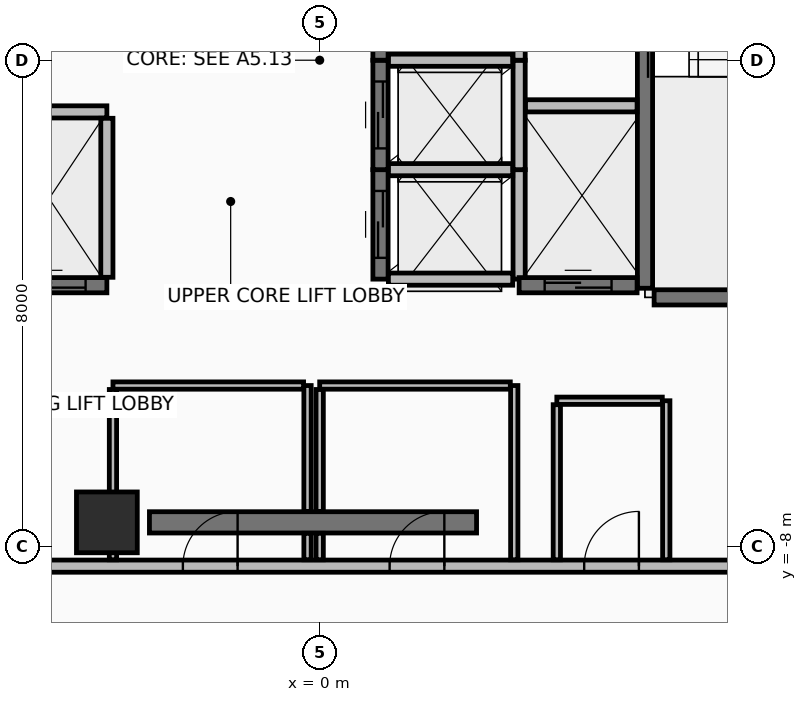
"""IFC4 building model, lengths in metres.
Left out: names, types, materials, properties, quantities, classifications, styles, units other than length and angle.
Written with IfcOpenShell. Run it as: python <this file> out.ifc"""

import sys

from ifc_helpers import new_model, si_unit, direction, frame, frame_2d, origin, origin_2d, place, context, subcontext, project, spatial, rectangle, extrude, element, fill, save


model = new_model("IFC4")
c1 = context("Model", 3, precision=1e-05, world=origin(), true_north=direction((0.0, 1.0)))
c2 = subcontext(c1, "Body", "Model", "MODEL_VIEW")
j1 = project(units=[si_unit("LENGTHUNIT", "METRE"), si_unit("PLANEANGLEUNIT", "RADIAN")], contexts=[c1])
p1 = place(None, origin())
s1 = spatial("IfcSite", under=j1, at=p1, CompositionType="ELEMENT")
p2 = place(p1, origin())
s2 = spatial("IfcBuilding", under=s1, at=p2, CompositionType="ELEMENT")
p3 = place(p2, frame((0.0, 0.0, 279.75)))
s3 = spatial("IfcBuildingStorey", under=s2, at=p3, CompositionType="ELEMENT", Elevation=279.75)
p4 = place(p3, frame((-3.5, -7.6, 0.0), z_axis=(0.0, 0.0, 1.0), x_axis=(1.0, 0.0, 0.0)))
e1 = element("IfcColumn", 1, at=p4, inside=s3, PredefinedType="COLUMN", context=c2, shape_type="SweptSolid", body=[
    extrude(rectangle(XDim=1.0, YDim=1.0, at=origin_2d()), origin(), (0.0, 0.0, 1.0), 3.65),
])
p5 = place(p3, frame((-2.8, -7.6, 0.0), z_axis=(0.0, 0.0, 1.0), x_axis=(1.0, 0.0, 0.0)))
e2 = element("IfcWall", 2, at=p5, inside=s3, PredefinedType="SHEAR", context=c2, shape_type="SweptSolid", body=[
    extrude(rectangle(XDim=5.38, YDim=0.35, at=frame_2d((2.69, 0.0))), origin(), (0.0, 0.0, 1.0), 3.465),
])
p6 = place(p3, frame((-9.62, -8.32, 0.0), z_axis=(0.0, 0.0, 1.0), x_axis=(1.0, 0.0, 0.0)))
e3 = element("IfcWall", 3, at=p6, inside=s3, PredefinedType="PARTITIONING", context=c2, shape_type="SweptSolid", body=[
    extrude(rectangle(XDim=19.24, YDim=0.2, at=frame_2d((9.62, 0.0))), origin(), (0.0, 0.0, 1.0), 2.96),
])
p7 = place(p6, frame((7.37, 0.0, 0.0)))
e4 = element("IfcOpeningElement", 4, at=p7, cuts=e3, PredefinedType="OPENING", context=c2, shape_type="SweptSolid", body=[
    extrude(rectangle(XDim=0.9, YDim=2.1, at=frame_2d((0.45, 1.05))), frame((0.0, 0.11, 0.0), z_axis=(0.0, -1.0, 0.0), x_axis=(1.0, 0.0, 0.0)), (0.0, 0.0, 1.0), 0.22),
])
p8 = place(p6, frame((10.77, 0.0, 0.0)))
e5 = element("IfcOpeningElement", 5, at=p8, cuts=e3, PredefinedType="OPENING", context=c2, shape_type="SweptSolid", body=[
    extrude(rectangle(XDim=0.9, YDim=2.1, at=frame_2d((0.45, 1.05))), frame((0.0, 0.11, 0.0), z_axis=(0.0, -1.0, 0.0), x_axis=(1.0, 0.0, 0.0)), (0.0, 0.0, 1.0), 0.22),
])
p9 = place(p6, frame((13.97, 0.0, 0.0)))
e6 = element("IfcOpeningElement", 6, at=p9, cuts=e3, PredefinedType="OPENING", context=c2, shape_type="SweptSolid", body=[
    extrude(rectangle(XDim=0.9, YDim=2.1, at=frame_2d((0.45, 1.05))), frame((0.0, 0.11, 0.0), z_axis=(0.0, -1.0, 0.0), x_axis=(1.0, 0.0, 0.0)), (0.0, 0.0, 1.0), 0.22),
])
p10 = place(p3, frame((5.35, -3.75, 0.0), z_axis=(0.0, 0.0, 1.0), x_axis=(0.0, 1.0, 0.0)))
e7 = element("IfcWall", 7, at=p10, inside=s3, PredefinedType="SHEAR", context=c2, shape_type="SweptSolid", body=[
    extrude(rectangle(XDim=7.3, YDim=0.25, at=frame_2d((3.65, 0.0))), origin(), (0.0, 0.0, 1.0), 3.465),
])
p11 = place(p3, frame((5.5, -3.9, 0.0), z_axis=(0.0, 0.0, 1.0), x_axis=(1.0, 0.0, 0.0)))
e8 = element("IfcWall", 8, at=p11, inside=s3, PredefinedType="SHEAR", context=c2, shape_type="SweptSolid", body=[
    extrude(rectangle(XDim=3.0, YDim=0.25, at=frame_2d((1.5, 0.0))), origin(), (0.0, 0.0, 1.0), 3.465),
])
p12 = place(p3, frame((1.0, -3.6, 0.0), z_axis=(0.0, 0.0, 1.0), x_axis=(0.0, 1.0, 0.0)))
e9 = element("IfcWall", 9, at=p12, inside=s3, PredefinedType="SHEAR", context=c2, shape_type="SweptSolid", body=[
    extrude(rectangle(XDim=1.8, YDim=0.25, at=frame_2d((0.9, 0.0))), origin(), (0.0, 0.0, 1.0), 3.465),
])
p13 = place(p12, frame((0.35, 0.0, 0.0)))
e10 = element("IfcOpeningElement", 10, at=p13, cuts=e9, PredefinedType="OPENING", context=c2, shape_type="SweptSolid", body=[
    extrude(rectangle(XDim=1.1, YDim=2.2, at=frame_2d((0.55, 1.1))), frame((0.0, 0.135, 0.0), z_axis=(0.0, -1.0, 0.0), x_axis=(1.0, 0.0, 0.0)), (0.0, 0.0, 1.0), 0.27),
])
p14 = place(p3, frame((3.28, -3.6, 0.0), z_axis=(0.0, 0.0, 1.0), x_axis=(0.0, 1.0, 0.0)))
e11 = element("IfcWall", 11, at=p14, inside=s3, PredefinedType="PARTITIONING", context=c2, shape_type="SweptSolid", body=[
    extrude(rectangle(XDim=1.8, YDim=0.2, at=frame_2d((0.9, 0.0))), origin(), (0.0, 0.0, 1.0), 3.465),
])
for number, where, z_axis, x_axis in (
    (12, (1.13, -3.6, 0.0), (0.0, 0.0, 1.0), (1.0, 0.0, 0.0)),
    (13, (1.13, -1.8, 0.0), (0.0, 0.0, 1.0), (1.0, 0.0, 0.0)),
):
    element("IfcWall", number, at=place(p3, frame(where, z_axis=z_axis, x_axis=x_axis)), inside=s3, PredefinedType="PARTITIONING", context=c2, shape_type="SweptSolid", body=[
        extrude(rectangle(XDim=2.045, YDim=0.2, at=frame_2d((1.022, 0.0))), origin(), (0.0, 0.0, 1.0), 3.465),
    ])
p15 = place(p3, frame((1.0, -1.8, 0.0), z_axis=(0.0, 0.0, 1.0), x_axis=(0.0, 1.0, 0.0)))
e14 = element("IfcWall", 14, at=p15, inside=s3, PredefinedType="SHEAR", context=c2, shape_type="SweptSolid", body=[
    extrude(rectangle(XDim=1.8, YDim=0.25, at=frame_2d((0.9, 0.0))), origin(), (0.0, 0.0, 1.0), 3.465),
])
p16 = place(p15, frame((0.35, 0.0, 0.0)))
e15 = element("IfcOpeningElement", 15, at=p16, cuts=e14, PredefinedType="OPENING", context=c2, shape_type="SweptSolid", body=[
    extrude(rectangle(XDim=1.1, YDim=2.2, at=frame_2d((0.55, 1.1))), frame((0.0, 0.135, 0.0), z_axis=(0.0, -1.0, 0.0), x_axis=(1.0, 0.0, 0.0)), (0.0, 0.0, 1.0), 0.27),
])
p17 = place(p3, frame((3.28, -1.8, 0.0), z_axis=(0.0, 0.0, 1.0), x_axis=(0.0, 1.0, 0.0)))
e16 = element("IfcWall", 16, at=p17, inside=s3, PredefinedType="PARTITIONING", context=c2, shape_type="SweptSolid", body=[
    extrude(rectangle(XDim=1.8, YDim=0.2, at=frame_2d((0.9, 0.0))), origin(), (0.0, 0.0, 1.0), 3.465),
])
p18 = place(p3, frame((1.13, 0.0, 0.0), z_axis=(0.0, 0.0, 1.0), x_axis=(1.0, 0.0, 0.0)))
e17 = element("IfcWall", 17, at=p18, inside=s3, PredefinedType="PARTITIONING", context=c2, shape_type="SweptSolid", body=[
    extrude(rectangle(XDim=2.045, YDim=0.2, at=frame_2d((1.022, 0.0))), origin(), (0.0, 0.0, 1.0), 3.465),
])
p19 = place(p3, frame((1.0, 0.0, 0.0), z_axis=(0.0, 0.0, 1.0), x_axis=(0.0, 1.0, 0.0)))
e18 = element("IfcWall", 18, at=p19, inside=s3, PredefinedType="SHEAR", context=c2, shape_type="SweptSolid", body=[
    extrude(rectangle(XDim=1.8, YDim=0.25, at=frame_2d((0.9, 0.0))), origin(), (0.0, 0.0, 1.0), 3.465),
])
p20 = place(p19, frame((0.35, 0.0, 0.0)))
e19 = element("IfcOpeningElement", 19, at=p20, cuts=e18, PredefinedType="OPENING", context=c2, shape_type="SweptSolid", body=[
    extrude(rectangle(XDim=1.1, YDim=2.2, at=frame_2d((0.55, 1.1))), frame((0.0, 0.135, 0.0), z_axis=(0.0, -1.0, 0.0), x_axis=(1.0, 0.0, 0.0)), (0.0, 0.0, 1.0), 0.27),
])
p21 = place(p3, frame((3.28, 0.0, 0.0), z_axis=(0.0, 0.0, 1.0), x_axis=(0.0, 1.0, 0.0)))
e20 = element("IfcWall", 20, at=p21, inside=s3, PredefinedType="PARTITIONING", context=c2, shape_type="SweptSolid", body=[
    extrude(rectangle(XDim=1.8, YDim=0.2, at=frame_2d((0.9, 0.0))), origin(), (0.0, 0.0, 1.0), 3.465),
])
p22 = place(p3, frame((-5.4, -3.7, 0.0), z_axis=(0.0, 0.0, 1.0), x_axis=(1.0, 0.0, 0.0)))
e21 = element("IfcWall", 21, at=p22, inside=s3, PredefinedType="SHEAR", context=c2, shape_type="SweptSolid", body=[
    extrude(rectangle(XDim=1.9, YDim=0.25, at=frame_2d((0.95, 0.0))), origin(), (0.0, 0.0, 1.0), 3.465),
])
p23 = place(p22, frame((0.35, 0.0, 0.0)))
e22 = element("IfcOpeningElement", 22, at=p23, cuts=e21, PredefinedType="OPENING", context=c2, shape_type="SweptSolid", body=[
    extrude(rectangle(XDim=1.2, YDim=2.2, at=frame_2d((0.6, 1.1))), frame((0.0, 0.135, 0.0), z_axis=(0.0, -1.0, 0.0), x_axis=(1.0, 0.0, 0.0)), (0.0, 0.0, 1.0), 0.27),
])
p24 = place(p3, frame((-5.27, -0.85, 0.0), z_axis=(0.0, 0.0, 1.0), x_axis=(1.0, 0.0, 0.0)))
e23 = element("IfcWall", 23, at=p24, inside=s3, PredefinedType="PARTITIONING", context=c2, shape_type="SweptSolid", body=[
    extrude(rectangle(XDim=1.77, YDim=0.2, at=frame_2d((0.885, 0.0))), origin(), (0.0, 0.0, 1.0), 3.465),
])
p25 = place(p3, frame((-3.5, -3.57, 0.0), z_axis=(0.0, 0.0, 1.0), x_axis=(0.0, 1.0, 0.0)))
e24 = element("IfcWall", 24, at=p25, inside=s3, PredefinedType="PARTITIONING", context=c2, shape_type="SweptSolid", body=[
    extrude(rectangle(XDim=2.615, YDim=0.2, at=frame_2d((1.308, 0.0))), origin(), (0.0, 0.0, 1.0), 3.465),
])
p26 = place(p3, frame((3.28, -3.7, 0.0), z_axis=(0.0, 0.0, 1.0), x_axis=(1.0, 0.0, 0.0)))
e25 = element("IfcWall", 25, at=p26, inside=s3, PredefinedType="SHEAR", context=c2, shape_type="SweptSolid", body=[
    extrude(rectangle(XDim=1.94, YDim=0.25, at=frame_2d((0.97, 0.0))), origin(), (0.0, 0.0, 1.0), 3.465),
])
p27 = place(p26, frame((0.42, 0.0, 0.0)))
e26 = element("IfcOpeningElement", 26, at=p27, cuts=e25, PredefinedType="OPENING", context=c2, shape_type="SweptSolid", body=[
    extrude(rectangle(XDim=1.1, YDim=2.2, at=frame_2d((0.55, 1.1))), frame((0.0, 0.135, 0.0), z_axis=(0.0, -1.0, 0.0), x_axis=(1.0, 0.0, 0.0)), (0.0, 0.0, 1.0), 0.27),
])
p28 = place(p3, frame((3.385, -0.75, 0.0), z_axis=(0.0, 0.0, 1.0), x_axis=(1.0, 0.0, 0.0)))
e27 = element("IfcWall", 27, at=p28, inside=s3, PredefinedType="PARTITIONING", context=c2, shape_type="SweptSolid", body=[
    extrude(rectangle(XDim=1.835, YDim=0.2, at=frame_2d((0.917, 0.0))), origin(), (0.0, 0.0, 1.0), 3.465),
])
p29 = place(p3, frame((-0.2, -8.215, 0.0), z_axis=(0.0, 0.0, 1.0), x_axis=(0.0, 1.0, 0.0)))
e28 = element("IfcWall", 28, at=p29, inside=s3, PredefinedType="PARTITIONING", context=c2, shape_type="SweptSolid", body=[
    extrude(rectangle(XDim=0.435, YDim=0.12, at=frame_2d((0.218, 0.0))), origin(), (0.0, 0.0, 1.0), 2.76),
])
p30 = place(p3, frame((-0.2, -7.42, 0.0), z_axis=(0.0, 0.0, 1.0), x_axis=(0.0, 1.0, 0.0)))
e29 = element("IfcWall", 29, at=p30, inside=s3, PredefinedType="PARTITIONING", context=c2, shape_type="SweptSolid", body=[
    extrude(rectangle(XDim=2.07, YDim=0.12, at=frame_2d((1.035, 0.0))), origin(), (0.0, 0.0, 1.0), 2.76),
])
p31 = place(p3, frame((-0.265, -5.35, 0.0), z_axis=(0.0, 0.0, 1.0), x_axis=(-1.0, 0.0, 0.0)))
e30 = element("IfcWall", 30, at=p31, inside=s3, PredefinedType="PARTITIONING", context=c2, shape_type="SweptSolid", body=[
    extrude(rectangle(XDim=3.135, YDim=0.12, at=frame_2d((1.567, 0.0))), origin(), (0.0, 0.0, 1.0), 2.76),
])
p32 = place(p3, frame((-3.4, -5.415, 0.0), z_axis=(0.0, 0.0, 1.0), x_axis=(0.0, -1.0, 0.0)))
e31 = element("IfcWall", 31, at=p32, inside=s3, PredefinedType="PARTITIONING", context=c2, shape_type="SweptSolid", body=[
    extrude(rectangle(XDim=2.8, YDim=0.12, at=frame_2d((1.4, 0.0))), origin(), (0.0, 0.0, 1.0), 2.76),
])
p33 = place(p3, frame((3.2, -8.215, 0.0), z_axis=(0.0, 0.0, 1.0), x_axis=(0.0, 1.0, 0.0)))
e32 = element("IfcWall", 32, at=p33, inside=s3, PredefinedType="PARTITIONING", context=c2, shape_type="SweptSolid", body=[
    extrude(rectangle(XDim=2.865, YDim=0.12, at=frame_2d((1.433, 0.0))), origin(), (0.0, 0.0, 1.0), 2.76),
])
p34 = place(p3, frame((3.135, -5.35, 0.0), z_axis=(0.0, 0.0, 1.0), x_axis=(-1.0, 0.0, 0.0)))
e33 = element("IfcWall", 33, at=p34, inside=s3, PredefinedType="PARTITIONING", context=c2, shape_type="SweptSolid", body=[
    extrude(rectangle(XDim=3.135, YDim=0.12, at=frame_2d((1.567, 0.0))), origin(), (0.0, 0.0, 1.0), 3.465),
])
p35 = place(p3, frame((0.0, -5.415, 0.0), z_axis=(0.0, 0.0, 1.0), x_axis=(0.0, -1.0, 0.0)))
e34 = element("IfcWall", 34, at=p35, inside=s3, PredefinedType="PARTITIONING", context=c2, shape_type="SweptSolid", body=[
    extrude(rectangle(XDim=2.005, YDim=0.12, at=frame_2d((1.002, 0.0))), origin(), (0.0, 0.0, 1.0), 2.76),
])
p36 = place(p3, frame((0.0, -7.78, 0.0), z_axis=(0.0, 0.0, 1.0), x_axis=(0.0, -1.0, 0.0)))
e35 = element("IfcWall", 35, at=p36, inside=s3, PredefinedType="PARTITIONING", context=c2, shape_type="SweptSolid", body=[
    extrude(rectangle(XDim=0.435, YDim=0.12, at=frame_2d((0.218, 0.0))), origin(), (0.0, 0.0, 1.0), 2.76),
])
p37 = place(p3, frame((5.7, -8.215, 0.0), z_axis=(0.0, 0.0, 1.0), x_axis=(0.0, 1.0, 0.0)))
e36 = element("IfcWall", 36, at=p37, inside=s3, PredefinedType="PARTITIONING", context=c2, shape_type="SweptSolid", body=[
    extrude(rectangle(XDim=2.615, YDim=0.12, at=frame_2d((1.308, 0.0))), origin(), (0.0, 0.0, 1.0), 2.76),
])
p38 = place(p3, frame((5.635, -5.6, 0.0), z_axis=(0.0, 0.0, 1.0), x_axis=(-1.0, 0.0, 0.0)))
e37 = element("IfcWall", 37, at=p38, inside=s3, PredefinedType="PARTITIONING", context=c2, shape_type="SweptSolid", body=[
    extrude(rectangle(XDim=1.735, YDim=0.12, at=frame_2d((0.868, 0.0))), origin(), (0.0, 0.0, 1.0), 3.465),
])
p39 = place(p3, frame((3.9, -5.665, 0.0), z_axis=(0.0, 0.0, 1.0), x_axis=(0.0, -1.0, 0.0)))
e38 = element("IfcWall", 38, at=p39, inside=s3, PredefinedType="PARTITIONING", context=c2, shape_type="SweptSolid", body=[
    extrude(rectangle(XDim=2.55, YDim=0.12, at=frame_2d((1.275, 0.0))), origin(), (0.0, 0.0, 1.0), 2.76),
])
p40 = place(p13, origin())
e39 = element("IfcDoor", 39, at=p40, inside=s3, OperationType="SLIDING_TO_LEFT", PredefinedType="DOOR", context=c2, shape_type="SweptSolid", body=[
    extrude(rectangle(XDim=1.1, YDim=2.2, at=frame_2d((0.55, 1.1))), frame((0.0, 0.025, 0.0), z_axis=(0.0, -1.0, 0.0), x_axis=(1.0, 0.0, 0.0)), (0.0, 0.0, 1.0), 0.05),
])
fill(e10, e39)
p41 = place(p16, origin())
e40 = element("IfcDoor", 40, at=p41, inside=s3, OperationType="SLIDING_TO_LEFT", PredefinedType="DOOR", context=c2, shape_type="SweptSolid", body=[
    extrude(rectangle(XDim=1.1, YDim=2.2, at=frame_2d((0.55, 1.1))), frame((0.0, 0.025, 0.0), z_axis=(0.0, -1.0, 0.0), x_axis=(1.0, 0.0, 0.0)), (0.0, 0.0, 1.0), 0.05),
])
fill(e15, e40)
p42 = place(p23, origin())
e41 = element("IfcDoor", 41, at=p42, inside=s3, OperationType="SLIDING_TO_RIGHT", PredefinedType="DOOR", context=c2, shape_type="SweptSolid", body=[
    extrude(rectangle(XDim=1.2, YDim=2.2, at=frame_2d((0.6, 1.1))), frame((0.0, 0.025, 0.0), z_axis=(0.0, -1.0, 0.0), x_axis=(1.0, 0.0, 0.0)), (0.0, 0.0, 1.0), 0.05),
])
fill(e22, e41)
p43 = place(p27, origin())
e42 = element("IfcDoor", 42, at=p43, inside=s3, OperationType="SLIDING_TO_LEFT", PredefinedType="DOOR", context=c2, shape_type="SweptSolid", body=[
    extrude(rectangle(XDim=1.1, YDim=2.2, at=frame_2d((0.55, 1.1))), frame((0.0, 0.025, 0.0), z_axis=(0.0, -1.0, 0.0), x_axis=(1.0, 0.0, 0.0)), (0.0, 0.0, 1.0), 0.05),
])
fill(e26, e42)
p44 = place(p7, frame((0.9, 0.0, 0.0), z_axis=(0.0, 0.0, 1.0), x_axis=(-1.0, 0.0, 0.0)))
e43 = element("IfcDoor", 43, at=p44, inside=s3, OperationType="SINGLE_SWING_LEFT", PredefinedType="DOOR", context=c2, shape_type="SweptSolid", body=[
    extrude(rectangle(XDim=0.9, YDim=2.1, at=frame_2d((0.45, 1.05))), frame((0.0, 0.025, 0.0), z_axis=(0.0, -1.0, 0.0), x_axis=(1.0, 0.0, 0.0)), (0.0, 0.0, 1.0), 0.05),
])
fill(e4, e43)
p45 = place(p8, frame((0.9, 0.0, 0.0), z_axis=(0.0, 0.0, 1.0), x_axis=(-1.0, 0.0, 0.0)))
e44 = element("IfcDoor", 44, at=p45, inside=s3, OperationType="SINGLE_SWING_LEFT", PredefinedType="DOOR", context=c2, shape_type="SweptSolid", body=[
    extrude(rectangle(XDim=0.9, YDim=2.1, at=frame_2d((0.45, 1.05))), frame((0.0, 0.025, 0.0), z_axis=(0.0, -1.0, 0.0), x_axis=(1.0, 0.0, 0.0)), (0.0, 0.0, 1.0), 0.05),
])
fill(e5, e44)
p46 = place(p9, frame((0.9, 0.0, 0.0), z_axis=(0.0, 0.0, 1.0), x_axis=(-1.0, 0.0, 0.0)))
e45 = element("IfcDoor", 45, at=p46, inside=s3, OperationType="SINGLE_SWING_LEFT", PredefinedType="DOOR", context=c2, shape_type="SweptSolid", body=[
    extrude(rectangle(XDim=0.9, YDim=2.1, at=frame_2d((0.45, 1.05))), frame((0.0, 0.025, 0.0), z_axis=(0.0, -1.0, 0.0), x_axis=(1.0, 0.0, 0.0)), (0.0, 0.0, 1.0), 0.05),
])
fill(e6, e45)
save(model, sys.argv[1])
